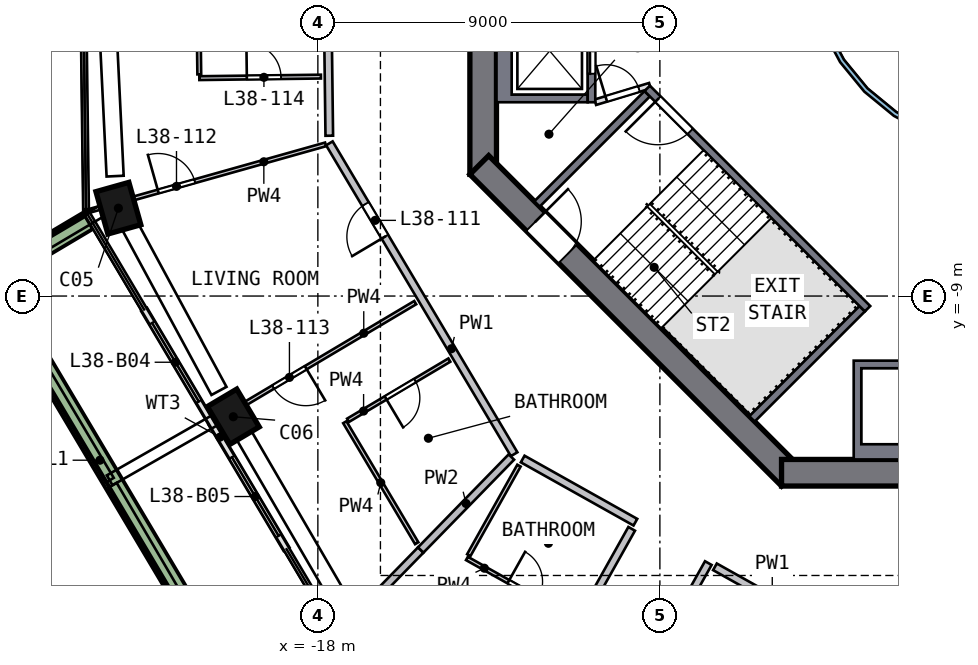
"""IFC4 building model, lengths in metres.
Left out: names, types, materials, properties, quantities, classifications, styles, units other than length and angle.
Written with IfcOpenShell. Run it as: python <this file> out.ifc"""

import sys

from ifc_helpers import new_model, si_unit, direction, frame, frame_2d, origin, origin_2d, place, context, subcontext, project, spatial, polyline, rectangle, outline, extrude, element, fill, save


model = new_model("IFC4")
c1 = context("Model", 3, precision=1e-05, world=origin(), true_north=direction((0.0, 1.0)))
c2 = subcontext(c1, "Body", "Model", "MODEL_VIEW")
j1 = project(units=[si_unit("LENGTHUNIT", "METRE"), si_unit("PLANEANGLEUNIT", "RADIAN")], contexts=[c1])
p1 = place(None, origin())
s1 = spatial("IfcSite", under=j1, at=p1, CompositionType="ELEMENT")
p2 = place(p1, origin())
s2 = spatial("IfcBuilding", under=s1, at=p2, CompositionType="ELEMENT")
p3 = place(p2, frame((0.0, 0.0, 158.5)))
s3 = spatial("IfcBuildingStorey", under=s2, at=p3, CompositionType="ELEMENT", Elevation=158.5)
p4 = place(p3, frame((-23.288, -6.555, 0.0), z_axis=(0.032083171, -0.110466464, 0.993361883), x_axis=(-0.26894855, 0.956261182, 0.115027077)))
e1 = element("IfcColumn", 1, at=p4, inside=s3, PredefinedType="COLUMN", context=c2, shape_type="SweptSolid", body=[
    extrude(rectangle(XDim=1.15, YDim=0.9, at=origin_2d()), origin(), (0.0, 0.0, 1.0), 3.211),
])
p5 = place(p3, frame((-20.295, -12.06, 0.0), z_axis=(0.058178989, -0.095976319, 0.993681917), x_axis=(0.507873055, -0.854089929, -0.11222902)))
e2 = element("IfcColumn", 2, at=p5, inside=s3, PredefinedType="COLUMN", context=c2, shape_type="SweptSolid", body=[
    extrude(rectangle(XDim=1.15, YDim=0.9, at=origin_2d()), origin(), (0.0, 0.0, 1.0), 3.21),
])
p6 = place(p3, frame((-13.65, 5.799, 0.0), z_axis=(0.0, 0.0, 1.0), x_axis=(0.0, -1.0, 0.0)))
e3 = element("IfcWall", 3, at=p6, inside=s3, PredefinedType="SHEAR", context=c2, shape_type="SweptSolid", body=[
    extrude(rectangle(XDim=11.598, YDim=0.7, at=frame_2d((5.799, 0.0))), origin(), (0.0, 0.0, 1.0), 3.5),
])
p7 = place(p6, frame((4.899, 0.0, 0.0)))
e4 = element("IfcOpeningElement", 4, at=p7, cuts=e3, PredefinedType="OPENING", context=c2, shape_type="SweptSolid", body=[
    extrude(rectangle(XDim=1.8, YDim=2.1, at=frame_2d((0.9, 1.05))), frame((0.0, 0.36, 0.0), z_axis=(0.0, -1.0, 0.0), x_axis=(1.0, 0.0, 0.0)), (0.0, 0.0, 1.0), 0.72),
])
p8 = place(p3, frame((-13.752, -5.552, 0.0), z_axis=(0.0, 0.0, 1.0), x_axis=(0.707106781, -0.707106781, 0.0)))
e5 = element("IfcWall", 5, at=p8, inside=s3, PredefinedType="SHEAR", context=c2, shape_type="SweptSolid", body=[
    extrude(rectangle(XDim=11.598, YDim=0.7, at=frame_2d((5.799, 0.0))), origin(), (0.0, 0.0, 1.0), 3.5),
])
p9 = place(p8, frame((2.099, 0.0, 0.0)))
e6 = element("IfcOpeningElement", 6, at=p9, cuts=e5, PredefinedType="OPENING", context=c2, shape_type="SweptSolid", body=[
    extrude(rectangle(XDim=1.2, YDim=2.1, at=frame_2d((0.6, 1.05))), frame((0.0, 0.36, 0.0), z_axis=(0.0, -1.0, 0.0), x_axis=(1.0, 0.0, 0.0)), (0.0, 0.0, 1.0), 0.72),
])
p10 = place(p3, frame((-5.799, -13.65, 0.0), z_axis=(0.0, 0.0, 1.0), x_axis=(1.0, 0.0, 0.0)))
e7 = element("IfcWall", 7, at=p10, inside=s3, PredefinedType="SHEAR", context=c2, shape_type="SweptSolid", body=[
    extrude(rectangle(XDim=11.598, YDim=0.7, at=frame_2d((5.799, 0.0))), origin(), (0.0, 0.0, 1.0), 3.5),
])
p11 = place(p10, frame((4.899, 0.0, 0.0)))
e8 = element("IfcOpeningElement", 8, at=p11, cuts=e7, PredefinedType="OPENING", context=c2, shape_type="SweptSolid", body=[
    extrude(rectangle(XDim=1.8, YDim=2.1, at=frame_2d((0.9, 1.05))), frame((0.0, 0.36, 0.0), z_axis=(0.0, -1.0, 0.0), x_axis=(1.0, 0.0, 0.0)), (0.0, 0.0, 1.0), 0.72),
])
p12 = place(p3, frame((-22.565, -9.366, 0.0), z_axis=(0.0, 0.0, 1.0), x_axis=(0.510813046, -0.859691824, 0.0)))
e9 = element("IfcWall", 9, at=p12, inside=s3, PredefinedType="SOLIDWALL", context=c2, shape_type="SweptSolid", body=[
    extrude(rectangle(XDim=3.475, YDim=0.15, at=frame_2d((1.738, 0.0))), origin(), (0.0, 0.0, 1.0), 2.475),
])
p13 = place(p12, frame((0.4, 0.0, 0.0)))
e10 = element("IfcOpeningElement", 10, at=p13, cuts=e9, PredefinedType="OPENING", context=c2, shape_type="SweptSolid", body=[
    extrude(rectangle(XDim=2.4, YDim=2.4, at=frame_2d((1.2, 1.2))), frame((0.0, 0.085, 0.0), z_axis=(0.0, -1.0, 0.0), x_axis=(1.0, 0.0, 0.0)), (0.0, 0.0, 1.0), 0.17),
])
p14 = place(p3, frame((-20.79, -12.354, 0.0), z_axis=(0.0, 0.0, 1.0), x_axis=(0.51088727, -0.859647717, 0.0)))
e11 = element("IfcWall", 11, at=p14, inside=s3, PredefinedType="SOLIDWALL", context=c2, shape_type="SweptSolid", body=[
    extrude(rectangle(XDim=3.835, YDim=0.15, at=frame_2d((1.918, 0.0))), origin(), (0.0, 0.0, 1.0), 2.475),
])
p15 = place(p14, frame((1.035, 0.0, 0.0)))
e12 = element("IfcOpeningElement", 12, at=p15, cuts=e11, PredefinedType="OPENING", context=c2, shape_type="SweptSolid", body=[
    extrude(rectangle(XDim=2.4, YDim=2.4, at=frame_2d((1.2, 1.2))), frame((0.0, 0.085, 0.0), z_axis=(0.0, -1.0, 0.0), x_axis=(1.0, 0.0, 0.0)), (0.0, 0.0, 1.0), 0.17),
])
p16 = place(p3, frame((-24.048, -7.02, 0.0), z_axis=(0.0, 0.0, 1.0), x_axis=(-0.859673576, -0.510843756, 0.0)))
e13 = element("IfcWall", 13, at=p16, inside=s3, PredefinedType="SOLIDWALL", context=c2, shape_type="SweptSolid", body=[
    extrude(rectangle(XDim=3.199, YDim=0.5, at=frame_2d((1.6, 0.0))), origin(), (0.0, 0.0, 1.0), 0.7),
])
p17 = place(p3, frame((-26.455, -8.741, 0.0), z_axis=(0.0, 0.0, 1.0), x_axis=(0.510844266, -0.859673273, 0.0)))
e14 = element("IfcWall", 14, at=p17, inside=s3, PredefinedType="SOLIDWALL", context=c2, shape_type="SweptSolid", body=[
    extrude(rectangle(XDim=10.652, YDim=0.5, at=frame_2d((5.326, 0.0))), origin(), (0.0, 0.0, 1.0), 0.7),
])
p18 = place(p3, origin())
e15 = element("IfcWall", 15, at=p18, inside=s3, PredefinedType="SOLIDWALL", context=c2, shape_type="SweptSolid", body=[
    extrude(outline(polyline([(-13.3, -3.9), (-13.3, -1.2), (-10.9, -1.2), (-10.9, -1.4), (-12.9, -1.4), (-12.9, -3.7), (-10.9, -3.7), (-10.9, -3.9), (-13.3, -3.9)])), origin(), (0.0, 0.0, 1.0), 3.19),
])
p19 = place(p3, frame((-10.8, -1.2, 0.0), z_axis=(0.0, 0.0, 1.0), x_axis=(0.0, -1.0, 0.0)))
e16 = element("IfcWall", 16, at=p19, inside=s3, PredefinedType="SOLIDWALL", context=c2, shape_type="SweptSolid", body=[
    extrude(rectangle(XDim=2.7, YDim=0.2, at=frame_2d((1.35, 0.0))), origin(), (0.0, 0.0, 1.0), 3.19),
])
p20 = place(p19, frame((0.75, 0.0, 0.0)))
e17 = element("IfcOpeningElement", 17, at=p20, cuts=e16, PredefinedType="OPENING", context=c2, shape_type="SweptSolid", body=[
    extrude(rectangle(XDim=1.2, YDim=2.1, at=frame_2d((0.6, 1.05))), frame((0.0, 0.11, 0.0), z_axis=(0.0, -1.0, 0.0), x_axis=(1.0, 0.0, 0.0)), (0.0, 0.0, 1.0), 0.22),
])
p21 = place(p3, origin())
e18 = element("IfcWall", 18, at=p21, inside=s3, PredefinedType="SOLIDWALL", context=c2, shape_type="SweptSolid", body=[
    extrude(outline(polyline([(-1.2, -13.3), (-3.9, -13.3), (-3.9, -10.7), (-1.2, -10.7), (-1.2, -13.3)]), holes=[polyline([(-3.7, -10.9), (-3.7, -12.9), (-1.4, -12.9), (-1.4, -10.9), (-3.7, -10.9)])]), origin(), (0.0, 0.0, 1.0), 3.19),
])
p22 = place(p3, frame((-3.535, -9.334, 0.0), z_axis=(0.0, 0.0, 1.0), x_axis=(-0.707106781, 0.707106781, 0.0)))
e19 = element("IfcWall", 19, at=p22, inside=s3, PredefinedType="SOLIDWALL", context=c2, shape_type="SweptSolid", body=[
    extrude(rectangle(XDim=8.2, YDim=0.2, at=frame_2d((4.1, 0.0))), origin(), (0.0, 0.0, 1.0), 3.19),
])
p23 = place(p22, frame((6.6, 0.0, 0.0)))
e20 = element("IfcOpeningElement", 20, at=p23, cuts=e19, PredefinedType="OPENING", context=c2, shape_type="SweptSolid", body=[
    extrude(rectangle(XDim=1.2, YDim=2.1, at=frame_2d((0.6, 1.05))), frame((0.0, 0.11, 0.0), z_axis=(0.0, -1.0, 0.0), x_axis=(1.0, 0.0, 0.0)), (0.0, 0.0, 1.0), 0.22),
])
for number, where, z_axis, x_axis in (
    (21, (-9.334, -3.677, 0.0), (0.0, 0.0, 1.0), (-0.707, -0.707, 0.0)),
    (22, (-3.677, -9.334, 0.0), (0.0, 0.0, 1.0), (-0.707, -0.707, 0.0)),
):
    element("IfcWall", number, at=place(p3, frame(where, z_axis=z_axis, x_axis=x_axis)), inside=s3, PredefinedType="SOLIDWALL", context=c2, shape_type="SweptSolid", body=[
        extrude(rectangle(XDim=4.1, YDim=0.2, at=frame_2d((2.05, 0.0))), origin(), (0.0, 0.0, 1.0), 3.19),
    ])
p24 = place(p3, frame((-10.7, -3.9, 0.0), z_axis=(0.0, 0.0, 1.0), x_axis=(0.957084567, 0.289808785, 0.0)))
e23 = element("IfcWall", 23, at=p24, inside=s3, PredefinedType="PARTITIONING", context=c2, shape_type="SweptSolid", body=[
    extrude(rectangle(XDim=1.501, YDim=0.15, at=frame_2d((0.75, 0.0))), origin(), (0.0, 0.0, 1.0), 3.19),
])
p25 = place(p24, frame((0.301, 0.0, 0.0)))
e24 = element("IfcOpeningElement", 24, at=p25, cuts=e23, PredefinedType="OPENING", context=c2, shape_type="SweptSolid", body=[
    extrude(rectangle(XDim=0.9, YDim=2.1, at=frame_2d((0.45, 1.05))), frame((0.0, 0.085, 0.0), z_axis=(0.0, -1.0, 0.0), x_axis=(1.0, 0.0, 0.0)), (0.0, 0.0, 1.0), 0.17),
])
p26 = place(p3, origin())
e25 = element("IfcWall", 25, at=p26, inside=s3, PredefinedType="SOLIDWALL", context=c2, shape_type="SweptSolid", body=[
    extrude(outline(polyline([(5.021, -0.999), (4.73, -1.959), (4.257, -2.844), (3.62, -3.62), (2.844, -4.257), (1.959, -4.73), (0.999, -5.021), (0.0, -5.12), (-0.999, -5.021), (-1.959, -4.73), (-2.844, -4.257), (-3.62, -3.62), (-4.257, -2.844), (-4.73, -1.959), (-5.021, -0.999), (-5.12, 0.0), (-5.021, 0.999), (-4.73, 1.959), (-4.257, 2.844), (-3.62, 3.62), (-2.844, 4.257), (-1.959, 4.73), (-0.999, 5.021), (0.0, 5.12), (0.999, 5.021), (1.959, 4.73), (2.844, 4.257), (3.62, 3.62), (4.257, 2.844), (4.73, 1.959), (5.021, 0.999), (5.12, 0.0), (5.021, -0.999)]), holes=[polyline([(4.904, 0.976), (4.619, 1.913), (4.157, 2.778), (3.535, 3.535), (2.778, 4.157), (1.913, 4.619), (0.976, 4.904), (0.0, 5.0), (-0.976, 4.904), (-1.913, 4.619), (-2.778, 4.157), (-3.535, 3.535), (-4.157, 2.778), (-4.619, 1.913), (-4.904, 0.976), (-5.0, 0.0), (-4.904, -0.976), (-4.619, -1.913), (-4.157, -2.778), (-3.535, -3.535), (-2.778, -4.157), (-1.913, -4.619), (-0.976, -4.904), (0.0, -5.0), (0.976, -4.904), (1.913, -4.619), (2.778, -4.157), (3.535, -3.535), (4.157, -2.778), (4.619, -1.913), (4.904, -0.976), (5.0, 0.0), (4.904, 0.976)])]), origin(), (0.0, 0.0, 1.0), 3.19),
])
p27 = place(p3, frame((-17.814, 4.335, 0.0), z_axis=(0.0, 0.0, 1.0), x_axis=(0.012559939, -0.999921121, 0.0)))
e26 = element("IfcWall", 26, at=p27, inside=s3, PredefinedType="SOLIDWALL", context=c2, shape_type="SweptSolid", body=[
    extrude(rectangle(XDim=9.116, YDim=0.2, at=frame_2d((4.558, 0.0))), origin(), (0.0, 0.0, 1.0), 3.19),
])
p28 = place(p3, frame((-12.836, -13.162, 0.0), z_axis=(0.0, 0.0, 1.0), x_axis=(-0.510831537, 0.859680836, 0.0)))
e27 = element("IfcWall", 27, at=p28, inside=s3, PredefinedType="SOLIDWALL", context=c2, shape_type="SweptSolid", body=[
    extrude(rectangle(XDim=9.517, YDim=0.2, at=frame_2d((4.758, 0.0))), origin(), (0.0, 0.0, 1.0), 3.19),
])
p29 = place(p28, frame((6.658, 0.0, 0.0)))
e28 = element("IfcOpeningElement", 28, at=p29, cuts=e27, PredefinedType="OPENING", context=c2, shape_type="SweptSolid", body=[
    extrude(rectangle(XDim=1.0, YDim=2.1, at=frame_2d((0.5, 1.05))), frame((0.0, 0.11, 0.0), z_axis=(0.0, -1.0, 0.0), x_axis=(1.0, 0.0, 0.0)), (0.0, 0.0, 1.0), 0.22),
])
p30 = place(p3, frame((-9.742, -15.126, 0.0), z_axis=(0.0, 0.0, 1.0), x_axis=(-0.48907786, -0.872240131, 0.0)))
e29 = element("IfcWall", 29, at=p30, inside=s3, PredefinedType="SOLIDWALL", context=c2, shape_type="SweptSolid", body=[
    extrude(rectangle(XDim=7.3, YDim=0.2, at=frame_2d((3.65, 0.0))), origin(), (0.0, 0.0, 1.0), 3.19),
])
p31 = place(p3, frame((-12.61, -13.289, 0.0), z_axis=(0.0, 0.0, 1.0), x_axis=(0.872270806, -0.489023149, 0.0)))
e30 = element("IfcWall", 30, at=p31, inside=s3, PredefinedType="SOLIDWALL", context=c2, shape_type="SweptSolid", body=[
    extrude(rectangle(XDim=3.4, YDim=0.2, at=frame_2d((1.7, 0.0))), origin(), (0.0, 0.0, 1.0), 3.19),
])
p32 = place(p3, frame((-7.726, -16.028, 0.0), z_axis=(0.0, 0.0, 1.0), x_axis=(-0.489093951, -0.872231109, 0.0)))
e31 = element("IfcWall", 31, at=p32, inside=s3, PredefinedType="SOLIDWALL", context=c2, shape_type="SweptSolid", body=[
    extrude(rectangle(XDim=7.5, YDim=0.2, at=frame_2d((3.75, 0.0))), origin(), (0.0, 0.0, 1.0), 3.19),
])
p33 = place(p32, frame((1.85, 0.0, 0.0)))
e32 = element("IfcOpeningElement", 32, at=p33, cuts=e31, PredefinedType="OPENING", context=c2, shape_type="SweptSolid", body=[
    extrude(rectangle(XDim=1.0, YDim=2.1, at=frame_2d((0.5, 1.05))), frame((0.0, 0.11, 0.0), z_axis=(0.0, -1.0, 0.0), x_axis=(1.0, 0.0, 0.0)), (0.0, 0.0, 1.0), 0.22),
])
p34 = place(p3, frame((-7.551, -16.125, 0.0), z_axis=(0.0, 0.0, 1.0), x_axis=(0.87222899, -0.489097729, 0.0)))
e33 = element("IfcWall", 33, at=p34, inside=s3, PredefinedType="SOLIDWALL", context=c2, shape_type="SweptSolid", body=[
    extrude(rectangle(XDim=3.458, YDim=0.2, at=frame_2d((1.729, 0.0))), origin(), (0.0, 0.0, 1.0), 3.19),
])
p35 = place(p3, frame((-15.293, -15.682, 0.0), z_axis=(0.0, 0.0, 1.0), x_axis=(-0.698153316, -0.715948286, 0.0)))
e34 = element("IfcWall", 34, at=p35, inside=s3, PredefinedType="SOLIDWALL", context=c2, shape_type="SweptSolid", body=[
    extrude(rectangle(XDim=3.06, YDim=0.2, at=frame_2d((1.53, 0.0))), origin(), (0.0, 0.0, 1.0), 3.19),
])
p36 = place(p3, frame((-12.908, -13.237, 0.0), z_axis=(0.0, 0.0, 1.0), x_axis=(-0.698189888, -0.71591262, 0.0)))
e35 = element("IfcWall", 35, at=p36, inside=s3, PredefinedType="SOLIDWALL", context=c2, shape_type="SweptSolid", body=[
    extrude(rectangle(XDim=3.416, YDim=0.2, at=frame_2d((1.708, 0.0))), origin(), (0.0, 0.0, 1.0), 3.19),
])
p37 = place(p3, frame((-21.154, -0.466, 0.0), z_axis=(0.0, 0.0, 1.0), x_axis=(0.012569092, -0.999921006, 0.0)))
e36 = element("IfcWall", 36, at=p37, inside=s3, PredefinedType="PARTITIONING", context=c2, shape_type="SweptSolid", body=[
    extrude(rectangle(XDim=2.7, YDim=0.1, at=frame_2d((1.35, 0.0))), origin(), (0.0, 0.0, 1.0), 3.19),
])
p38 = place(p3, frame((-24.03, -6.764, 0.0), z_axis=(0.0, 0.0, 1.0), x_axis=(0.962600564, 0.27092463, 0.0)))
e37 = element("IfcWall", 37, at=p38, inside=s3, PredefinedType="PARTITIONING", context=c2, shape_type="SweptSolid", body=[
    extrude(rectangle(XDim=6.476, YDim=0.1, at=frame_2d((3.238, 0.0))), origin(), (0.0, 0.0, 1.0), 3.19),
])
p39 = place(p38, frame((1.9, 0.0, 0.0)))
e38 = element("IfcOpeningElement", 38, at=p39, cuts=e37, PredefinedType="OPENING", context=c2, shape_type="SweptSolid", body=[
    extrude(rectangle(XDim=1.0, YDim=2.1, at=frame_2d((0.5, 1.05))), frame((0.0, 0.06, 0.0), z_axis=(0.0, -1.0, 0.0), x_axis=(1.0, 0.0, 0.0)), (0.0, 0.0, 1.0), 0.12),
])
p40 = place(p3, frame((-21.119, -3.266, 0.0), z_axis=(0.0, 0.0, 1.0), x_axis=(0.99992076, 0.012588656, 0.0)))
e39 = element("IfcWall", 39, at=p40, inside=s3, PredefinedType="PARTITIONING", context=c2, shape_type="SweptSolid", body=[
    extrude(rectangle(XDim=3.2, YDim=0.1, at=frame_2d((1.6, 0.0))), origin(), (0.0, 0.0, 1.0), 3.19),
])
p41 = place(p40, frame((1.25, 0.0, 0.0)))
e40 = element("IfcOpeningElement", 40, at=p41, cuts=e39, PredefinedType="OPENING", context=c2, shape_type="SweptSolid", body=[
    extrude(rectangle(XDim=0.9, YDim=2.1, at=frame_2d((0.45, 1.05))), frame((0.0, 0.06, 0.0), z_axis=(0.0, -1.0, 0.0), x_axis=(1.0, 0.0, 0.0)), (0.0, 0.0, 1.0), 0.12),
])
p42 = place(p3, frame((-15.438, -9.174, 0.0), z_axis=(0.0, 0.0, 1.0), x_axis=(-0.859667353, -0.510854228, 0.0)))
e41 = element("IfcWall", 41, at=p42, inside=s3, PredefinedType="PARTITIONING", context=c2, shape_type="SweptSolid", body=[
    extrude(rectangle(XDim=6.15, YDim=0.1, at=frame_2d((3.075, 0.0))), origin(), (0.0, 0.0, 1.0), 3.19),
])
p43 = place(p42, frame((3.35, 0.0, 0.0)))
e42 = element("IfcOpeningElement", 42, at=p43, cuts=e41, PredefinedType="OPENING", context=c2, shape_type="SweptSolid", body=[
    extrude(rectangle(XDim=1.0, YDim=2.1, at=frame_2d((0.5, 1.05))), frame((0.0, 0.06, 0.0), z_axis=(0.0, -1.0, 0.0), x_axis=(1.0, 0.0, 0.0)), (0.0, 0.0, 1.0), 0.12),
])
p44 = place(p3, frame((-17.291, -12.32, 0.0), z_axis=(0.0, 0.0, 1.0), x_axis=(0.51084636, -0.859672029, 0.0)))
e43 = element("IfcWall", 43, at=p44, inside=s3, PredefinedType="PARTITIONING", context=c2, shape_type="SweptSolid", body=[
    extrude(rectangle(XDim=3.704, YDim=0.1, at=frame_2d((1.852, 0.0))), origin(), (0.0, 0.0, 1.0), 3.19),
])
p45 = place(p3, frame((-14.54, -10.686, 0.0), z_axis=(0.0, 0.0, 1.0), x_axis=(-0.859694802, -0.510808033, 0.0)))
e44 = element("IfcWall", 44, at=p45, inside=s3, PredefinedType="PARTITIONING", context=c2, shape_type="SweptSolid", body=[
    extrude(rectangle(XDim=3.1, YDim=0.1, at=frame_2d((1.55, 0.0))), origin(), (0.0, 0.0, 1.0), 3.19),
])
p46 = place(p45, frame((1.05, 0.0, 0.0)))
e45 = element("IfcOpeningElement", 45, at=p46, cuts=e44, PredefinedType="OPENING", context=c2, shape_type="SweptSolid", body=[
    extrude(rectangle(XDim=0.9, YDim=2.1, at=frame_2d((0.45, 1.05))), frame((0.0, 0.06, 0.0), z_axis=(0.0, -1.0, 0.0), x_axis=(1.0, 0.0, 0.0)), (0.0, 0.0, 1.0), 0.12),
])
p47 = place(p3, frame((-12.708, -13.463, 0.0), z_axis=(0.0, 0.0, 1.0), x_axis=(-0.489101666, -0.872226783, 0.0)))
e46 = element("IfcWall", 46, at=p47, inside=s3, PredefinedType="PARTITIONING", context=c2, shape_type="SweptSolid", body=[
    extrude(rectangle(XDim=2.7, YDim=0.1, at=frame_2d((1.35, 0.0))), origin(), (0.0, 0.0, 1.0), 3.19),
])
p48 = place(p3, frame((-14.077, -15.906, 0.0), z_axis=(0.0, 0.0, 1.0), x_axis=(0.872243074, -0.489072612, 0.0)))
e47 = element("IfcWall", 47, at=p48, inside=s3, PredefinedType="PARTITIONING", context=c2, shape_type="SweptSolid", body=[
    extrude(rectangle(XDim=3.2, YDim=0.1, at=frame_2d((1.6, 0.0))), origin(), (0.0, 0.0, 1.0), 3.19),
])
p49 = place(p48, frame((1.25, 0.0, 0.0)))
e48 = element("IfcOpeningElement", 48, at=p49, cuts=e47, PredefinedType="OPENING", context=c2, shape_type="SweptSolid", body=[
    extrude(rectangle(XDim=0.9, YDim=2.1, at=frame_2d((0.45, 1.05))), frame((0.0, 0.06, 0.0), z_axis=(0.0, -1.0, 0.0), x_axis=(1.0, 0.0, 0.0)), (0.0, 0.0, 1.0), 0.12),
])
p50 = place(p13, origin())
e49 = element("IfcDoor", 49, at=p50, inside=s3, OperationType="SLIDING_TO_RIGHT", PredefinedType="DOOR", context=c2, shape_type="SweptSolid", body=[
    extrude(rectangle(XDim=2.4, YDim=2.4, at=frame_2d((1.2, 1.2))), frame((0.0, 0.025, 0.0), z_axis=(0.0, -1.0, 0.0), x_axis=(1.0, 0.0, 0.0)), (0.0, 0.0, 1.0), 0.05),
])
fill(e10, e49)
p51 = place(p15, origin())
e50 = element("IfcDoor", 50, at=p51, inside=s3, OperationType="SLIDING_TO_LEFT", PredefinedType="DOOR", context=c2, shape_type="SweptSolid", body=[
    extrude(rectangle(XDim=2.4, YDim=2.4, at=frame_2d((1.2, 1.2))), frame((0.0, 0.025, 0.0), z_axis=(0.0, -1.0, 0.0), x_axis=(1.0, 0.0, 0.0)), (0.0, 0.0, 1.0), 0.05),
])
fill(e12, e50)
p52 = place(p20, origin())
e51 = element("IfcDoor", 51, at=p52, inside=s3, OperationType="DOUBLE_DOOR_SLIDING", PredefinedType="DOOR", context=c2, shape_type="SweptSolid", body=[
    extrude(rectangle(XDim=1.2, YDim=2.1, at=frame_2d((0.6, 1.05))), frame((0.0, 0.025, 0.0), z_axis=(0.0, -1.0, 0.0), x_axis=(1.0, 0.0, 0.0)), (0.0, 0.0, 1.0), 0.05),
])
fill(e17, e51)
p53 = place(p23, origin())
e52 = element("IfcDoor", 52, at=p53, inside=s3, OperationType="SINGLE_SWING_RIGHT", PredefinedType="DOOR", context=c2, shape_type="SweptSolid", body=[
    extrude(rectangle(XDim=1.2, YDim=2.1, at=frame_2d((0.6, 1.05))), frame((0.0, 0.025, 0.0), z_axis=(0.0, -1.0, 0.0), x_axis=(1.0, 0.0, 0.0)), (0.0, 0.0, 1.0), 0.05),
])
fill(e20, e52)
p54 = place(p9, origin())
e53 = element("IfcDoor", 53, at=p54, inside=s3, OperationType="SINGLE_SWING_LEFT", PredefinedType="DOOR", context=c2, shape_type="SweptSolid", body=[
    extrude(rectangle(XDim=1.2, YDim=2.1, at=frame_2d((0.6, 1.05))), frame((0.0, 0.025, 0.0), z_axis=(0.0, -1.0, 0.0), x_axis=(1.0, 0.0, 0.0)), (0.0, 0.0, 1.0), 0.05),
])
fill(e6, e53)
p55 = place(p25, origin())
e54 = element("IfcDoor", 54, at=p55, inside=s3, OperationType="SINGLE_SWING_LEFT", PredefinedType="DOOR", context=c2, shape_type="SweptSolid", body=[
    extrude(rectangle(XDim=0.9, YDim=2.1, at=frame_2d((0.45, 1.05))), frame((0.0, 0.025, 0.0), z_axis=(0.0, -1.0, 0.0), x_axis=(1.0, 0.0, 0.0)), (0.0, 0.0, 1.0), 0.05),
])
fill(e24, e54)
p56 = place(p29, origin())
e55 = element("IfcDoor", 55, at=p56, inside=s3, OperationType="SINGLE_SWING_LEFT", PredefinedType="DOOR", context=c2, shape_type="SweptSolid", body=[
    extrude(rectangle(XDim=1.0, YDim=2.1, at=frame_2d((0.5, 1.05))), frame((0.0, 0.025, 0.0), z_axis=(0.0, -1.0, 0.0), x_axis=(1.0, 0.0, 0.0)), (0.0, 0.0, 1.0), 0.05),
])
fill(e28, e55)
p57 = place(p39, origin())
e56 = element("IfcDoor", 56, at=p57, inside=s3, OperationType="SINGLE_SWING_LEFT", PredefinedType="DOOR", context=c2, shape_type="SweptSolid", body=[
    extrude(rectangle(XDim=1.0, YDim=2.1, at=frame_2d((0.5, 1.05))), frame((0.0, 0.025, 0.0), z_axis=(0.0, -1.0, 0.0), x_axis=(1.0, 0.0, 0.0)), (0.0, 0.0, 1.0), 0.05),
])
fill(e38, e56)
p58 = place(p43, origin())
e57 = element("IfcDoor", 57, at=p58, inside=s3, OperationType="SINGLE_SWING_LEFT", PredefinedType="DOOR", context=c2, shape_type="SweptSolid", body=[
    extrude(rectangle(XDim=1.0, YDim=2.1, at=frame_2d((0.5, 1.05))), frame((0.0, 0.025, 0.0), z_axis=(0.0, -1.0, 0.0), x_axis=(1.0, 0.0, 0.0)), (0.0, 0.0, 1.0), 0.05),
])
fill(e42, e57)
p59 = place(p41, origin())
e58 = element("IfcDoor", 58, at=p59, inside=s3, OperationType="SINGLE_SWING_LEFT", PredefinedType="DOOR", context=c2, shape_type="SweptSolid", body=[
    extrude(rectangle(XDim=0.9, YDim=2.1, at=frame_2d((0.45, 1.05))), frame((0.0, 0.025, 0.0), z_axis=(0.0, -1.0, 0.0), x_axis=(1.0, 0.0, 0.0)), (0.0, 0.0, 1.0), 0.05),
])
fill(e40, e58)
p60 = place(p46, origin())
e59 = element("IfcDoor", 59, at=p60, inside=s3, OperationType="SINGLE_SWING_RIGHT", PredefinedType="DOOR", context=c2, shape_type="SweptSolid", body=[
    extrude(rectangle(XDim=0.9, YDim=2.1, at=frame_2d((0.45, 1.05))), frame((0.0, 0.025, 0.0), z_axis=(0.0, -1.0, 0.0), x_axis=(1.0, 0.0, 0.0)), (0.0, 0.0, 1.0), 0.05),
])
fill(e45, e59)
p61 = place(p49, origin())
e60 = element("IfcDoor", 60, at=p61, inside=s3, OperationType="SINGLE_SWING_LEFT", PredefinedType="DOOR", context=c2, shape_type="SweptSolid", body=[
    extrude(rectangle(XDim=0.9, YDim=2.1, at=frame_2d((0.45, 1.05))), frame((0.0, 0.025, 0.0), z_axis=(0.0, -1.0, 0.0), x_axis=(1.0, 0.0, 0.0)), (0.0, 0.0, 1.0), 0.05),
])
fill(e48, e60)
save(model, sys.argv[1])
